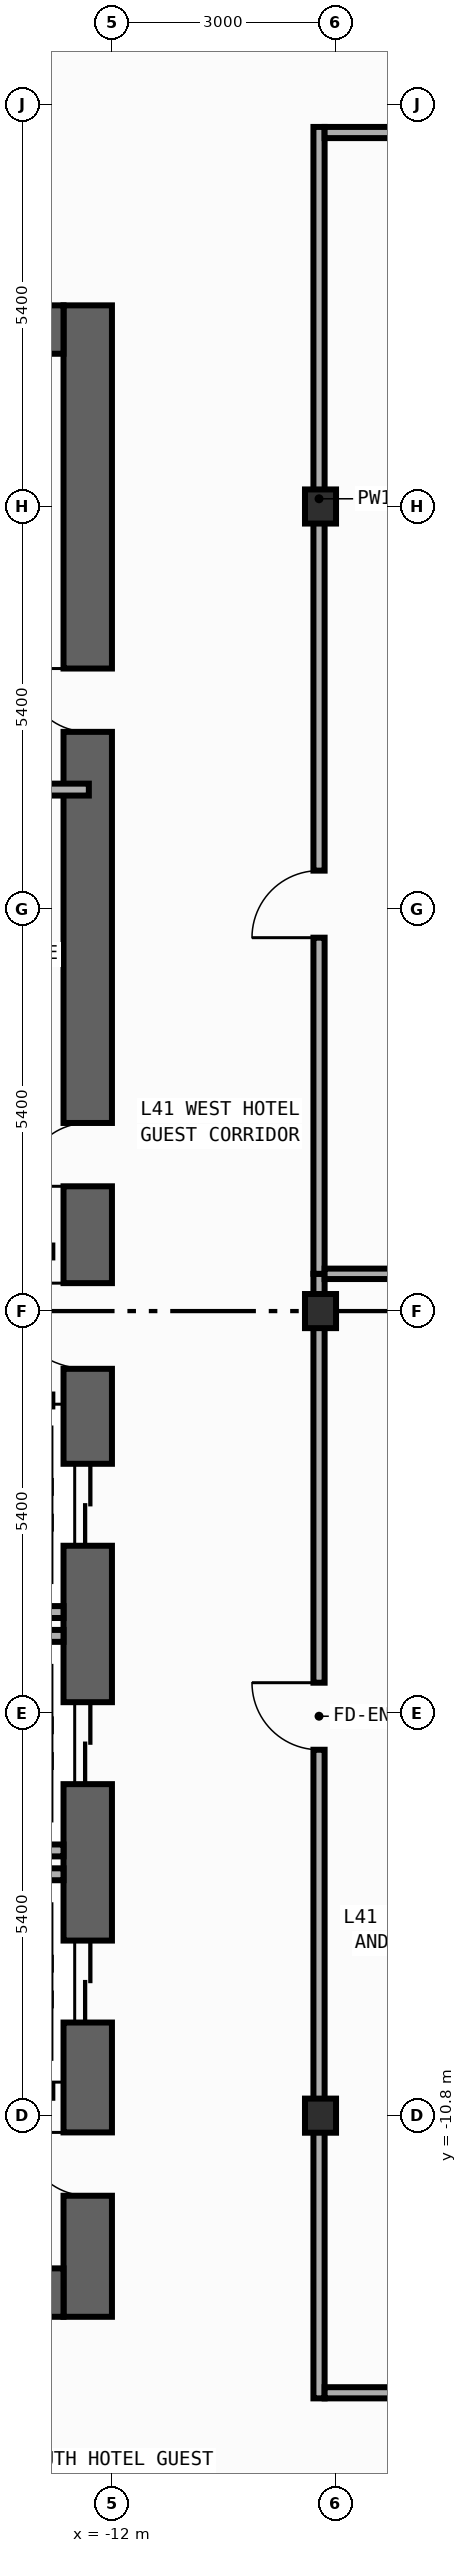
"""IFC4 building model, lengths in metres.
Left out: names, types, materials, properties, quantities, classifications, styles, units other than length and angle.
Written with IfcOpenShell. Run it as: python <this file> out.ifc"""

import sys

from ifc_helpers import new_model, si_unit, direction, frame, frame_2d, origin, origin_2d, place, context, subcontext, project, spatial, rectangle, i_section, extrude, element, fill, save


model = new_model("IFC4")
c1 = context("Model", 3, precision=1e-05, world=origin(), true_north=direction((0.0, 1.0)))
c2 = subcontext(c1, "Body", "Model", "MODEL_VIEW")
j1 = project(units=[si_unit("LENGTHUNIT", "METRE"), si_unit("PLANEANGLEUNIT", "RADIAN")], contexts=[c1])
p1 = place(None, origin())
s1 = spatial("IfcSite", under=j1, at=p1, CompositionType="ELEMENT")
p2 = place(p1, origin())
s2 = spatial("IfcBuilding", under=s1, at=p2, CompositionType="ELEMENT")
p3 = place(p2, frame((0.0, 0.0, 180.2)))
s3 = spatial("IfcBuildingStorey", under=s2, at=p3, CompositionType="ELEMENT", Elevation=180.2)
p4 = place(p3, frame((-12.325, -13.5, 0.0), z_axis=(0.0, 0.0, 1.0), x_axis=(0.0, 1.0, 0.0)))
e1 = element("IfcWall", 1, at=p4, inside=s3, PredefinedType="SHEAR", context=c2, shape_type="SweptSolid", body=[
    extrude(rectangle(XDim=27.0, YDim=0.65, at=frame_2d((13.5, 0.0))), origin(), (0.0, 0.0, 1.0), 3.54),
])
p5 = place(p4, frame((10.35, 0.0, 0.0)))
e2 = element("IfcOpeningElement", 2, at=p5, cuts=e1, PredefinedType="OPENING", context=c2, shape_type="SweptSolid", body=[
    extrude(rectangle(XDim=1.1, YDim=2.2, at=frame_2d((0.55, 1.1))), frame((0.0, 0.335, 0.0), z_axis=(0.0, -1.0, 0.0), x_axis=(1.0, 0.0, 0.0)), (0.0, 0.0, 1.0), 0.67),
])
p6 = place(p4, frame((7.15, 0.0, 0.0)))
e3 = element("IfcOpeningElement", 3, at=p6, cuts=e1, PredefinedType="OPENING", context=c2, shape_type="SweptSolid", body=[
    extrude(rectangle(XDim=1.1, YDim=2.2, at=frame_2d((0.55, 1.1))), frame((0.0, 0.335, 0.0), z_axis=(0.0, -1.0, 0.0), x_axis=(1.0, 0.0, 0.0)), (0.0, 0.0, 1.0), 0.67),
])
p7 = place(p4, frame((3.95, 0.0, 0.0)))
e4 = element("IfcOpeningElement", 4, at=p7, cuts=e1, PredefinedType="OPENING", context=c2, shape_type="SweptSolid", body=[
    extrude(rectangle(XDim=1.1, YDim=2.2, at=frame_2d((0.55, 1.1))), frame((0.0, 0.335, 0.0), z_axis=(0.0, -1.0, 0.0), x_axis=(1.0, 0.0, 0.0)), (0.0, 0.0, 1.0), 0.67),
])
p8 = place(p4, frame((15.175, 0.0, 0.0)))
e5 = element("IfcOpeningElement", 5, at=p8, cuts=e1, PredefinedType="OPENING", context=c2, shape_type="SweptSolid", body=[
    extrude(rectangle(XDim=0.85, YDim=2.1, at=frame_2d((0.425, 1.05))), frame((0.0, 0.335, 0.0), z_axis=(0.0, -1.0, 0.0), x_axis=(1.0, 0.0, 0.0)), (0.0, 0.0, 1.0), 0.67),
])
p9 = place(p4, frame((21.275, 0.0, 0.0)))
e6 = element("IfcOpeningElement", 6, at=p9, cuts=e1, PredefinedType="OPENING", context=c2, shape_type="SweptSolid", body=[
    extrude(rectangle(XDim=0.85, YDim=2.1, at=frame_2d((0.425, 1.05))), frame((0.0, 0.335, 0.0), z_axis=(0.0, -1.0, 0.0), x_axis=(1.0, 0.0, 0.0)), (0.0, 0.0, 1.0), 0.67),
])
p10 = place(p4, frame((12.725, 0.0, 0.0)))
e7 = element("IfcOpeningElement", 7, at=p10, cuts=e1, PredefinedType="OPENING", context=c2, shape_type="SweptSolid", body=[
    extrude(rectangle(XDim=1.15, YDim=2.2, at=frame_2d((0.575, 1.1))), frame((0.0, 0.335, 0.0), z_axis=(0.0, -1.0, 0.0), x_axis=(1.0, 0.0, 0.0)), (0.0, 0.0, 1.0), 0.67),
])
p11 = place(p4, frame((1.625, 0.0, 0.0)))
e8 = element("IfcOpeningElement", 8, at=p11, cuts=e1, PredefinedType="OPENING", context=c2, shape_type="SweptSolid", body=[
    extrude(rectangle(XDim=0.85, YDim=2.1, at=frame_2d((0.425, 1.05))), frame((0.0, 0.335, 0.0), z_axis=(0.0, -1.0, 0.0), x_axis=(1.0, 0.0, 0.0)), (0.0, 0.0, 1.0), 0.67),
])
for number, where, z_axis, x_axis in (
    (9, (-19.75, -13.175, 0.0), (0.0, 0.0, 1.0), (1.0, 0.0, 0.0)),
    (10, (-19.75, 13.175, 0.0), (0.0, 0.0, 1.0), (1.0, 0.0, 0.0)),
):
    element("IfcWall", number, at=place(p3, frame(where, z_axis=z_axis, x_axis=x_axis)), inside=s3, PredefinedType="SHEAR", context=c2, shape_type="SweptSolid", body=[
        extrude(rectangle(XDim=7.1, YDim=0.65, at=frame_2d((3.55, 0.0))), origin(), (0.0, 0.0, 1.0), 3.54),
    ])
for number, where, z_axis, x_axis in (
    (11, (-9.2, -10.8, 0.0), (0.0, 0.0, 1.0), (1.0, 0.0, 0.0)),
    (12, (-9.2, 0.0, 0.0), (0.0, 0.0, 1.0), (1.0, 0.0, 0.0)),
    (13, (-9.2, 10.8, 0.0), (0.0, 0.0, 1.0), (1.0, 0.0, 0.0)),
):
    element("IfcColumn", number, at=place(p3, frame(where, z_axis=z_axis, x_axis=x_axis)), inside=s3, PredefinedType="COLUMN", context=c2, shape_type="SweptSolid", body=[
        extrude(i_section(OverallWidth=0.417, OverallDepth=0.458, WebThickness=0.03, FlangeThickness=0.05, FilletRadius=0.022, at=origin_2d()), origin(), (0.0, 0.0, 1.0), 3.8),
    ])
for number, where, z_axis, x_axis in (
    (14, (-14.99, -4.04, 0.0), (0.0, 0.0, 1.0), (1.0, 0.0, 0.0)),
    (15, (-14.99, -7.24, 0.0), (0.0, 0.0, 1.0), (1.0, 0.0, 0.0)),
    (16, (-14.99, -4.36, 0.0), (0.0, 0.0, 1.0), (1.0, 0.0, 0.0)),
    (17, (-14.99, -7.56, 0.0), (0.0, 0.0, 1.0), (1.0, 0.0, 0.0)),
):
    element("IfcWall", number, at=place(p3, frame(where, z_axis=z_axis, x_axis=x_axis)), inside=s3, PredefinedType="STANDARD", context=c2, shape_type="SweptSolid", body=[
        extrude(rectangle(XDim=2.34, YDim=0.16, at=frame_2d((1.17, 0.0))), origin(), (0.0, 0.0, 1.0), 3.54),
    ])
p12 = place(p3, frame((-15.375, 7.0, 0.0), z_axis=(0.0, 0.0, 1.0), x_axis=(1.0, 0.0, 0.0)))
e18 = element("IfcWall", 18, at=p12, inside=s3, PredefinedType="PARTITIONING", context=c2, shape_type="SweptSolid", body=[
    extrude(rectangle(XDim=3.065, YDim=0.16, at=frame_2d((1.532, 0.0))), origin(), (0.0, 0.0, 1.0), 3.54),
])
p13 = place(p3, frame((-9.22, -14.595, 0.0), z_axis=(0.0, 0.0, 1.0), x_axis=(0.0, 1.0, 0.0)))
e19 = element("IfcWall", 19, at=p13, inside=s3, PredefinedType="PARTITIONING", context=c2, shape_type="SweptSolid", body=[
    extrude(rectangle(XDim=15.095, YDim=0.15, at=frame_2d((7.547, 0.0))), origin(), (0.0, 0.0, 1.0), 2.952),
])
p14 = place(p13, frame((8.707, 0.0, 0.0)))
e20 = element("IfcOpeningElement", 20, at=p14, cuts=e19, PredefinedType="OPENING", context=c2, shape_type="SweptSolid", body=[
    extrude(rectangle(XDim=0.9, YDim=2.15, at=frame_2d((0.45, 1.075))), frame((0.0, 0.085, 0.0), z_axis=(0.0, -1.0, 0.0), x_axis=(1.0, 0.0, 0.0)), (0.0, 0.0, 1.0), 0.17),
])
p15 = place(p3, frame((-9.22, 0.5, 0.0), z_axis=(0.0, 0.0, 1.0), x_axis=(0.0, 1.0, 0.0)))
e21 = element("IfcWall", 21, at=p15, inside=s3, PredefinedType="PARTITIONING", context=c2, shape_type="SweptSolid", body=[
    extrude(rectangle(XDim=15.395, YDim=0.15, at=frame_2d((7.698, 0.0))), origin(), (0.0, 0.0, 1.0), 2.952),
])
p16 = place(p15, frame((4.512, 0.0, 0.0)))
e22 = element("IfcOpeningElement", 22, at=p16, cuts=e21, PredefinedType="OPENING", context=c2, shape_type="SweptSolid", body=[
    extrude(rectangle(XDim=0.9, YDim=2.15, at=frame_2d((0.45, 1.075))), frame((0.0, 0.085, 0.0), z_axis=(0.0, -1.0, 0.0), x_axis=(1.0, 0.0, 0.0)), (0.0, 0.0, 1.0), 0.17),
])
p17 = place(p3, frame((-9.145, 15.82, 0.0), z_axis=(0.0, 0.0, 1.0), x_axis=(1.0, 0.0, 0.0)))
e23 = element("IfcWall", 23, at=p17, inside=s3, PredefinedType="PARTITIONING", context=c2, shape_type="SweptSolid", body=[
    extrude(rectangle(XDim=8.825, YDim=0.15, at=frame_2d((4.413, 0.0))), origin(), (0.0, 0.0, 1.0), 3.54),
])
p18 = place(p17, frame((1.661, 0.0, 0.0)))
e24 = element("IfcOpeningElement", 24, at=p18, cuts=e23, PredefinedType="OPENING", context=c2, shape_type="SweptSolid", body=[
    extrude(rectangle(XDim=0.9, YDim=2.15, at=frame_2d((0.45, 1.075))), frame((0.0, 0.085, 0.0), z_axis=(0.0, -1.0, 0.0), x_axis=(1.0, 0.0, 0.0)), (0.0, 0.0, 1.0), 0.17),
])
p19 = place(p3, frame((-9.145, -14.52, 0.0), z_axis=(0.0, 0.0, 1.0), x_axis=(1.0, 0.0, 0.0)))
e25 = element("IfcWall", 25, at=p19, inside=s3, PredefinedType="PARTITIONING", context=c2, shape_type="SweptSolid", body=[
    extrude(rectangle(XDim=3.025, YDim=0.15, at=frame_2d((1.512, 0.0))), origin(), (0.0, 0.0, 1.0), 3.54),
])
p20 = place(p19, frame((1.665, 0.0, 0.0)))
e26 = element("IfcOpeningElement", 26, at=p20, cuts=e25, PredefinedType="OPENING", context=c2, shape_type="SweptSolid", body=[
    extrude(rectangle(XDim=0.9, YDim=2.15, at=frame_2d((0.45, 1.075))), frame((0.0, 0.085, 0.0), z_axis=(0.0, -1.0, 0.0), x_axis=(1.0, 0.0, 0.0)), (0.0, 0.0, 1.0), 0.17),
])
p21 = place(p3, frame((-9.145, 0.5, 0.0), z_axis=(0.0, 0.0, 1.0), x_axis=(1.0, 0.0, 0.0)))
e27 = element("IfcWall", 27, at=p21, inside=s3, PredefinedType="PARTITIONING", context=c2, shape_type="SweptSolid", body=[
    extrude(rectangle(XDim=3.025, YDim=0.14, at=frame_2d((1.512, 0.0))), origin(), (0.0, 0.0, 1.0), 3.54),
])
p22 = place(p5, origin())
e28 = element("IfcDoor", 28, at=p22, inside=s3, OperationType="DOUBLE_DOOR_SLIDING", PredefinedType="DOOR", context=c2, shape_type="SweptSolid", body=[
    extrude(rectangle(XDim=1.1, YDim=2.2, at=frame_2d((0.55, 1.1))), frame((0.0, 0.025, 0.0), z_axis=(0.0, -1.0, 0.0), x_axis=(1.0, 0.0, 0.0)), (0.0, 0.0, 1.0), 0.05),
])
fill(e2, e28)
p23 = place(p6, origin())
e29 = element("IfcDoor", 29, at=p23, inside=s3, OperationType="DOUBLE_DOOR_SLIDING", PredefinedType="DOOR", context=c2, shape_type="SweptSolid", body=[
    extrude(rectangle(XDim=1.1, YDim=2.2, at=frame_2d((0.55, 1.1))), frame((0.0, 0.025, 0.0), z_axis=(0.0, -1.0, 0.0), x_axis=(1.0, 0.0, 0.0)), (0.0, 0.0, 1.0), 0.05),
])
fill(e3, e29)
p24 = place(p7, origin())
e30 = element("IfcDoor", 30, at=p24, inside=s3, OperationType="DOUBLE_DOOR_SLIDING", PredefinedType="DOOR", context=c2, shape_type="SweptSolid", body=[
    extrude(rectangle(XDim=1.1, YDim=2.2, at=frame_2d((0.55, 1.1))), frame((0.0, 0.025, 0.0), z_axis=(0.0, -1.0, 0.0), x_axis=(1.0, 0.0, 0.0)), (0.0, 0.0, 1.0), 0.05),
])
fill(e4, e30)
p25 = place(p8, origin())
e31 = element("IfcDoor", 31, at=p25, inside=s3, OperationType="SINGLE_SWING_LEFT", PredefinedType="DOOR", context=c2, shape_type="SweptSolid", body=[
    extrude(rectangle(XDim=0.85, YDim=2.1, at=frame_2d((0.425, 1.05))), frame((0.0, 0.025, 0.0), z_axis=(0.0, -1.0, 0.0), x_axis=(1.0, 0.0, 0.0)), (0.0, 0.0, 1.0), 0.05),
])
fill(e5, e31)
p26 = place(p9, origin())
e32 = element("IfcDoor", 32, at=p26, inside=s3, OperationType="SINGLE_SWING_RIGHT", PredefinedType="DOOR", context=c2, shape_type="SweptSolid", body=[
    extrude(rectangle(XDim=0.85, YDim=2.1, at=frame_2d((0.425, 1.05))), frame((0.0, 0.025, 0.0), z_axis=(0.0, -1.0, 0.0), x_axis=(1.0, 0.0, 0.0)), (0.0, 0.0, 1.0), 0.05),
])
fill(e6, e32)
p27 = place(p10, origin())
e33 = element("IfcDoor", 33, at=p27, inside=s3, OperationType="SINGLE_SWING_RIGHT", PredefinedType="DOOR", context=c2, shape_type="SweptSolid", body=[
    extrude(rectangle(XDim=1.15, YDim=2.2, at=frame_2d((0.575, 1.1))), frame((0.0, 0.025, 0.0), z_axis=(0.0, -1.0, 0.0), x_axis=(1.0, 0.0, 0.0)), (0.0, 0.0, 1.0), 0.05),
])
fill(e7, e33)
p28 = place(p11, origin())
e34 = element("IfcDoor", 34, at=p28, inside=s3, OperationType="SINGLE_SWING_RIGHT", PredefinedType="DOOR", context=c2, shape_type="SweptSolid", body=[
    extrude(rectangle(XDim=0.85, YDim=2.1, at=frame_2d((0.425, 1.05))), frame((0.0, 0.025, 0.0), z_axis=(0.0, -1.0, 0.0), x_axis=(1.0, 0.0, 0.0)), (0.0, 0.0, 1.0), 0.05),
])
fill(e8, e34)
p29 = place(p14, origin())
e35 = element("IfcDoor", 35, at=p29, inside=s3, OperationType="SINGLE_SWING_RIGHT", PredefinedType="DOOR", context=c2, shape_type="SweptSolid", body=[
    extrude(rectangle(XDim=0.9, YDim=2.15, at=frame_2d((0.45, 1.075))), frame((0.0, 0.025, 0.0), z_axis=(0.0, -1.0, 0.0), x_axis=(1.0, 0.0, 0.0)), (0.0, 0.0, 1.0), 0.05),
])
fill(e20, e35)
p30 = place(p16, origin())
e36 = element("IfcDoor", 36, at=p30, inside=s3, OperationType="SINGLE_SWING_LEFT", PredefinedType="DOOR", context=c2, shape_type="SweptSolid", body=[
    extrude(rectangle(XDim=0.9, YDim=2.15, at=frame_2d((0.45, 1.075))), frame((0.0, 0.025, 0.0), z_axis=(0.0, -1.0, 0.0), x_axis=(1.0, 0.0, 0.0)), (0.0, 0.0, 1.0), 0.05),
])
fill(e22, e36)
save(model, sys.argv[1])
